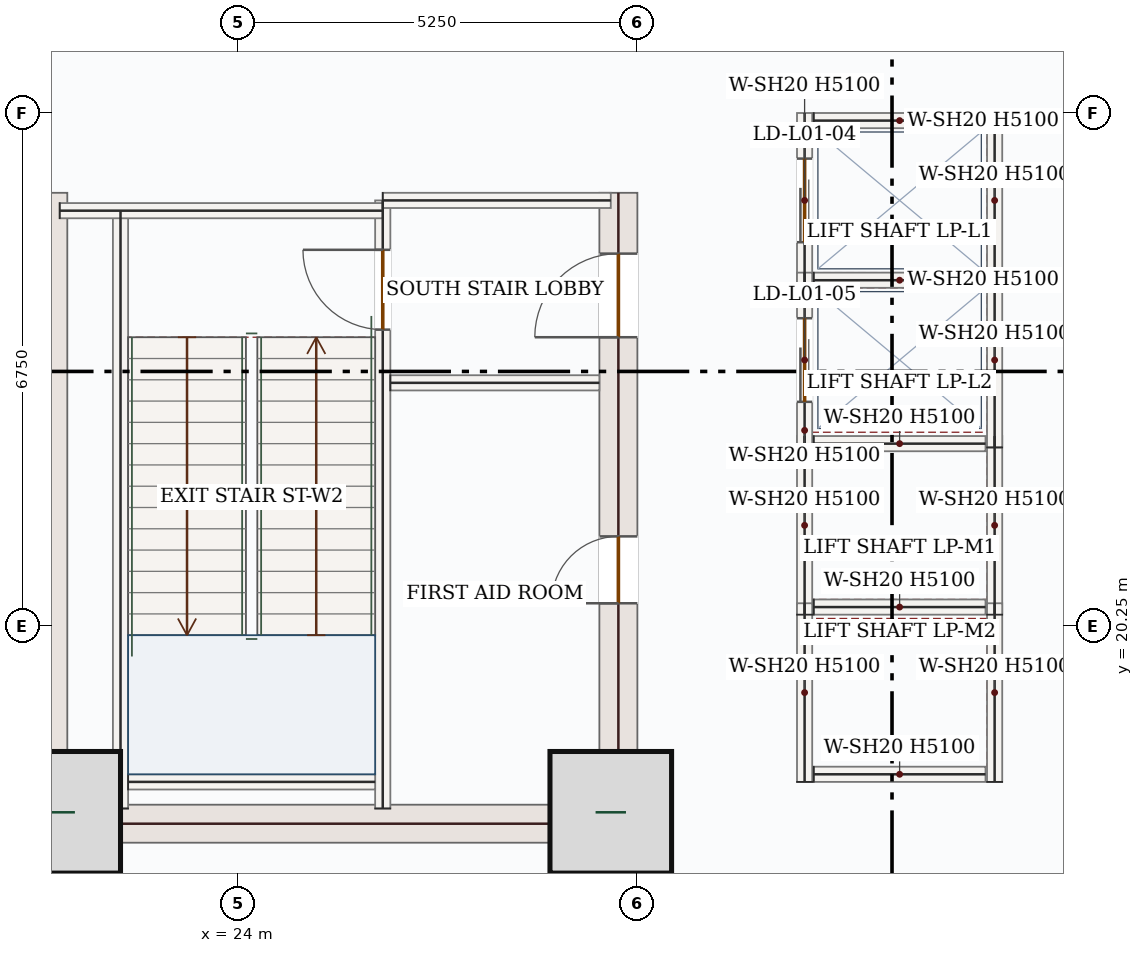
"""IFC4 building model, lengths in metres.
Left out: names, types, materials, properties, quantities, classifications, styles, units other than length and angle.
Written with IfcOpenShell. Run it as: python <this file> out.ifc"""

import sys

from ifc_helpers import new_model, si_unit, direction, frame, frame_2d, origin, origin_2d, place, context, subcontext, project, spatial, rectangle, extrude, source, transform, mapped, element, fill, save


model = new_model("IFC4")
c1 = context("Model", 3, precision=1e-05, world=origin(), true_north=direction((0.0, 1.0)))
c2 = subcontext(c1, "Body", "Model", "MODEL_VIEW")
j1 = project(units=[si_unit("LENGTHUNIT", "METRE"), si_unit("PLANEANGLEUNIT", "RADIAN")], contexts=[c1])
p1 = place(None, origin())
s1 = spatial("IfcSite", under=j1, at=p1, CompositionType="ELEMENT")
p2 = place(p1, origin())
s2 = spatial("IfcBuilding", under=s1, at=p2, CompositionType="ELEMENT")
p3 = place(p2, frame((0.0, 0.0, 7.2)))
s3 = spatial("IfcBuildingStorey", under=s2, at=p3, CompositionType="ELEMENT", Elevation=7.2)
m1 = source(origin(), c2, "Body", "SweptSolid", [
    extrude(rectangle(XDim=8.55, YDim=0.5, at=frame_2d((4.275, 0.0))), origin(), (0.0, 0.0, 1.0), 5.1),
])
p4 = place(p3, frame((21.5, 17.4, 0.0), z_axis=(0.0, 0.0, 1.0), x_axis=(0.0, 1.0, 0.0)))
e1 = element("IfcWall", 1, at=p4, inside=s3, PredefinedType="SHEAR", context=c2, shape_type="MappedRepresentation", body=[
    mapped(m1, transform((0.0, 0.0, 0.0), x_axis=(1.0, 0.0, 0.0), y_axis=(0.0, 1.0, 0.0), z_axis=(0.0, 0.0, 1.0), scale=1.0)),
])
p5 = place(p3, frame((29.0, 17.4, 0.0), z_axis=(0.0, 0.0, 1.0), x_axis=(0.0, 1.0, 0.0)))
e2 = element("IfcWall", 2, at=p5, inside=s3, PredefinedType="SHEAR", context=c2, shape_type="SweptSolid", body=[
    extrude(rectangle(XDim=8.55, YDim=0.5, at=frame_2d((4.275, 0.0))), origin(), (0.0, 0.0, 1.0), 5.1),
])
p6 = place(p5, frame((6.65, 0.0, 0.0)))
e3 = element("IfcOpeningElement", 3, at=p6, cuts=e2, PredefinedType="OPENING", context=c2, shape_type="SweptSolid", body=[
    extrude(rectangle(XDim=1.1, YDim=2.2, at=frame_2d((0.55, 1.1))), frame((0.0, 0.26, 0.0), z_axis=(0.0, -1.0, 0.0), x_axis=(1.0, 0.0, 0.0)), (0.0, 0.0, 1.0), 0.52),
])
p7 = place(p5, frame((3.15, 0.0, 0.0)))
e4 = element("IfcOpeningElement", 4, at=p7, cuts=e2, PredefinedType="OPENING", context=c2, shape_type="SweptSolid", body=[
    extrude(rectangle(XDim=0.88, YDim=2.1, at=frame_2d((0.44, 1.05))), frame((0.0, 0.26, 0.0), z_axis=(0.0, -1.0, 0.0), x_axis=(1.0, 0.0, 0.0)), (0.0, 0.0, 1.0), 0.52),
])
m2 = source(origin(), c2, "Body", "SweptSolid", [
    extrude(rectangle(XDim=7.0, YDim=0.5, at=frame_2d((3.5, 0.0))), origin(), (0.0, 0.0, 1.0), 5.1),
])
p8 = place(p3, frame((21.75, 17.65, 0.0), z_axis=(0.0, 0.0, 1.0), x_axis=(1.0, 0.0, 0.0)))
e5 = element("IfcWall", 5, at=p8, inside=s3, PredefinedType="SHEAR", context=c2, shape_type="MappedRepresentation", body=[
    mapped(m2, transform((0.0, 0.0, 0.0), x_axis=(1.0, 0.0, 0.0), y_axis=(0.0, 1.0, 0.0), z_axis=(0.0, 0.0, 1.0), scale=1.0)),
])
m3 = source(origin(), c2, "Body", "SweptSolid", [
    extrude(rectangle(XDim=1.6, YDim=1.6, at=origin_2d()), origin(), (0.0, 0.0, 1.0), 5.4),
])
for number, where, z_axis, x_axis in (
    (6, (21.65, 17.8, 0.0), (0.0, 0.0, 1.0), (1.0, 0.0, 0.0)),
    (7, (28.9, 17.8, 0.0), (0.0, 0.0, 1.0), (1.0, 0.0, 0.0)),
):
    element("IfcColumn", number, at=place(p3, frame(where, z_axis=z_axis, x_axis=x_axis)), inside=s3, PredefinedType="COLUMN", context=c2, shape_type="MappedRepresentation", body=[
        mapped(m3, transform((0.0, 0.0, 0.0), x_axis=(1.0, 0.0, 0.0), y_axis=(0.0, 1.0, 0.0), z_axis=(0.0, 0.0, 1.0), scale=1.0)),
    ])
m4 = source(origin(), c2, "Body", "SweptSolid", [
    extrude(rectangle(XDim=7.87, YDim=0.2, at=frame_2d((3.935, 0.0))), origin(), (0.0, 0.0, 1.0), 5.1),
])
p9 = place(p3, frame((22.45, 17.85, 0.0), z_axis=(0.0, 0.0, 1.0), x_axis=(0.0, 1.0, 0.0)))
e8 = element("IfcWall", 8, at=p9, inside=s3, PredefinedType="SOLIDWALL", context=c2, shape_type="MappedRepresentation", body=[
    mapped(m4, transform((0.0, 0.0, 0.0), x_axis=(1.0, 0.0, 0.0), y_axis=(0.0, 1.0, 0.0), z_axis=(0.0, 0.0, 1.0), scale=1.0)),
])
p10 = place(p3, frame((25.9, 17.85, 0.0), z_axis=(0.0, 0.0, 1.0), x_axis=(0.0, 1.0, 0.0)))
e9 = element("IfcWall", 9, at=p10, inside=s3, PredefinedType="SOLIDWALL", context=c2, shape_type="SweptSolid", body=[
    extrude(rectangle(XDim=8.0, YDim=0.2, at=frame_2d((4.0, 0.0))), origin(), (0.0, 0.0, 1.0), 5.1),
])
p11 = place(p10, frame((6.3, 0.0, 0.0)))
e10 = element("IfcOpeningElement", 10, at=p11, cuts=e9, PredefinedType="OPENING", context=c2, shape_type="SweptSolid", body=[
    extrude(rectangle(XDim=1.05, YDim=2.15, at=frame_2d((0.525, 1.075))), frame((0.0, 0.11, 0.0), z_axis=(0.0, -1.0, 0.0), x_axis=(1.0, 0.0, 0.0)), (0.0, 0.0, 1.0), 0.22),
])
m5 = source(origin(), c2, "Body", "SweptSolid", [
    extrude(rectangle(XDim=4.25, YDim=0.2, at=frame_2d((2.125, 0.0))), origin(), (0.0, 0.0, 1.0), 5.1),
])
p12 = place(p3, frame((21.65, 25.715, 0.0), z_axis=(0.0, 0.0, 1.0), x_axis=(1.0, 0.0, 0.0)))
e11 = element("IfcWall", 11, at=p12, inside=s3, PredefinedType="SOLIDWALL", context=c2, shape_type="MappedRepresentation", body=[
    mapped(m5, transform((0.0, 0.0, 0.0), x_axis=(1.0, 0.0, 0.0), y_axis=(0.0, 1.0, 0.0), z_axis=(0.0, 0.0, 1.0), scale=1.0)),
])
m6 = source(origin(), c2, "Body", "SweptSolid", [
    extrude(rectangle(XDim=3.0, YDim=0.2, at=frame_2d((1.5, 0.0))), origin(), (0.0, 0.0, 1.0), 5.1),
])
p13 = place(p3, frame((25.9, 25.85, 0.0), z_axis=(0.0, 0.0, 1.0), x_axis=(1.0, 0.0, 0.0)))
e12 = element("IfcWall", 12, at=p13, inside=s3, PredefinedType="SOLIDWALL", context=c2, shape_type="MappedRepresentation", body=[
    mapped(m6, transform((0.0, 0.0, 0.0), x_axis=(1.0, 0.0, 0.0), y_axis=(0.0, 1.0, 0.0), z_axis=(0.0, 0.0, 1.0), scale=1.0)),
])
m7 = source(origin(), c2, "Body", "SweptSolid", [
    extrude(rectangle(XDim=3.25, YDim=0.2, at=frame_2d((1.625, 0.0))), origin(), (0.0, 0.0, 1.0), 5.1),
])
p14 = place(p3, frame((22.55, 18.2, 0.0), z_axis=(0.0, 0.0, 1.0), x_axis=(1.0, 0.0, 0.0)))
e13 = element("IfcWall", 13, at=p14, inside=s3, PredefinedType="SOLIDWALL", context=c2, shape_type="MappedRepresentation", body=[
    mapped(m7, transform((0.0, 0.0, 0.0), x_axis=(1.0, 0.0, 0.0), y_axis=(0.0, 1.0, 0.0), z_axis=(0.0, 0.0, 1.0), scale=1.0)),
])
m8 = source(origin(), c2, "Body", "SweptSolid", [
    extrude(rectangle(XDim=2.75, YDim=0.2, at=frame_2d((1.375, 0.0))), origin(), (0.0, 0.0, 1.0), 5.1),
])
p15 = place(p3, frame((26.0, 23.45, 0.0), z_axis=(0.0, 0.0, 1.0), x_axis=(1.0, 0.0, 0.0)))
e14 = element("IfcWall", 14, at=p15, inside=s3, PredefinedType="SOLIDWALL", context=c2, shape_type="MappedRepresentation", body=[
    mapped(m8, transform((0.0, 0.0, 0.0), x_axis=(1.0, 0.0, 0.0), y_axis=(0.0, 1.0, 0.0), z_axis=(0.0, 0.0, 1.0), scale=1.0)),
])
m9 = source(origin(), c2, "Body", "SweptSolid", [
    extrude(rectangle(XDim=2.35, YDim=0.2, at=frame_2d((1.175, 0.0))), origin(), (0.0, 0.0, 1.0), 5.1),
])
for number, where, z_axis, x_axis in (
    (15, (31.45, 20.4, 0.0), (0.0, 0.0, 1.0), (0.0, 1.0, 0.0)),
    (16, (33.95, 20.4, 0.0), (0.0, 0.0, 1.0), (0.0, 1.0, 0.0)),
):
    element("IfcWall", number, at=place(p3, frame(where, z_axis=z_axis, x_axis=x_axis)), inside=s3, PredefinedType="SOLIDWALL", context=c2, shape_type="MappedRepresentation", body=[
        mapped(m9, transform((0.0, 0.0, 0.0), x_axis=(1.0, 0.0, 0.0), y_axis=(0.0, 1.0, 0.0), z_axis=(0.0, 0.0, 1.0), scale=1.0)),
    ])
m10 = source(origin(), c2, "Body", "SweptSolid", [
    extrude(rectangle(XDim=2.26, YDim=0.2, at=frame_2d((1.13, 0.0))), origin(), (0.0, 0.0, 1.0), 5.1),
])
for number, where, z_axis, x_axis in (
    (17, (31.57, 20.5, 0.0), (0.0, 0.0, 1.0), (1.0, 0.0, 0.0)),
    (18, (31.57, 22.65, 0.0), (0.0, 0.0, 1.0), (1.0, 0.0, 0.0)),
):
    element("IfcWall", number, at=place(p3, frame(where, z_axis=z_axis, x_axis=x_axis)), inside=s3, PredefinedType="SOLIDWALL", context=c2, shape_type="MappedRepresentation", body=[
        mapped(m10, transform((0.0, 0.0, 0.0), x_axis=(1.0, 0.0, 0.0), y_axis=(0.0, 1.0, 0.0), z_axis=(0.0, 0.0, 1.0), scale=1.0)),
    ])
for number, where, z_axis, x_axis in (
    (19, (31.45, 18.2, 0.0), (0.0, 0.0, 1.0), (0.0, 1.0, 0.0)),
    (20, (33.95, 18.2, 0.0), (0.0, 0.0, 1.0), (0.0, 1.0, 0.0)),
):
    element("IfcWall", number, at=place(p3, frame(where, z_axis=z_axis, x_axis=x_axis)), inside=s3, PredefinedType="SOLIDWALL", context=c2, shape_type="MappedRepresentation", body=[
        mapped(m9, transform((0.0, 0.0, 0.0), x_axis=(1.0, 0.0, 0.0), y_axis=(0.0, 1.0, 0.0), z_axis=(0.0, 0.0, 1.0), scale=1.0)),
    ])
p16 = place(p3, frame((31.57, 18.3, 0.0), z_axis=(0.0, 0.0, 1.0), x_axis=(1.0, 0.0, 0.0)))
e21 = element("IfcWall", 21, at=p16, inside=s3, PredefinedType="SOLIDWALL", context=c2, shape_type="MappedRepresentation", body=[
    mapped(m10, transform((0.0, 0.0, 0.0), x_axis=(1.0, 0.0, 0.0), y_axis=(0.0, 1.0, 0.0), z_axis=(0.0, 0.0, 1.0), scale=1.0)),
])
p17 = place(p3, frame((31.45, 24.7, 0.0), z_axis=(0.0, 0.0, 1.0), x_axis=(0.0, 1.0, 0.0)))
e22 = element("IfcWall", 22, at=p17, inside=s3, PredefinedType="SOLIDWALL", context=c2, shape_type="SweptSolid", body=[
    extrude(rectangle(XDim=2.3, YDim=0.2, at=frame_2d((1.15, 0.0))), origin(), (0.0, 0.0, 1.0), 5.1),
])
p18 = place(p17, frame((0.6, 0.0, 0.0)))
e23 = element("IfcOpeningElement", 23, at=p18, cuts=e22, PredefinedType="OPENING", context=c2, shape_type="SweptSolid", body=[
    extrude(rectangle(XDim=1.1, YDim=2.15, at=frame_2d((0.55, 1.075))), frame((0.0, 0.11, 0.0), z_axis=(0.0, -1.0, 0.0), x_axis=(1.0, 0.0, 0.0)), (0.0, 0.0, 1.0), 0.22),
])
m11 = source(origin(), c2, "Body", "SweptSolid", [
    extrude(rectangle(XDim=2.3, YDim=0.2, at=frame_2d((1.15, 0.0))), origin(), (0.0, 0.0, 1.0), 5.1),
])
p19 = place(p3, frame((33.95, 24.7, 0.0), z_axis=(0.0, 0.0, 1.0), x_axis=(0.0, 1.0, 0.0)))
e24 = element("IfcWall", 24, at=p19, inside=s3, PredefinedType="SOLIDWALL", context=c2, shape_type="MappedRepresentation", body=[
    mapped(m11, transform((0.0, 0.0, 0.0), x_axis=(1.0, 0.0, 0.0), y_axis=(0.0, 1.0, 0.0), z_axis=(0.0, 0.0, 1.0), scale=1.0)),
])
for number, where, z_axis, x_axis in (
    (25, (31.57, 24.8, 0.0), (0.0, 0.0, 1.0), (1.0, 0.0, 0.0)),
    (26, (31.57, 26.9, 0.0), (0.0, 0.0, 1.0), (1.0, 0.0, 0.0)),
):
    element("IfcWall", number, at=place(p3, frame(where, z_axis=z_axis, x_axis=x_axis)), inside=s3, PredefinedType="SOLIDWALL", context=c2, shape_type="MappedRepresentation", body=[
        mapped(m10, transform((0.0, 0.0, 0.0), x_axis=(1.0, 0.0, 0.0), y_axis=(0.0, 1.0, 0.0), z_axis=(0.0, 0.0, 1.0), scale=1.0)),
    ])
p20 = place(p3, frame((31.45, 22.6, 0.0), z_axis=(0.0, 0.0, 1.0), x_axis=(0.0, 1.0, 0.0)))
e27 = element("IfcWall", 27, at=p20, inside=s3, PredefinedType="SOLIDWALL", context=c2, shape_type="SweptSolid", body=[
    extrude(rectangle(XDim=2.3, YDim=0.2, at=frame_2d((1.15, 0.0))), origin(), (0.0, 0.0, 1.0), 5.1),
])
p21 = place(p20, frame((0.6, 0.0, 0.0)))
e28 = element("IfcOpeningElement", 28, at=p21, cuts=e27, PredefinedType="OPENING", context=c2, shape_type="SweptSolid", body=[
    extrude(rectangle(XDim=1.1, YDim=2.15, at=frame_2d((0.55, 1.075))), frame((0.0, 0.11, 0.0), z_axis=(0.0, -1.0, 0.0), x_axis=(1.0, 0.0, 0.0)), (0.0, 0.0, 1.0), 0.22),
])
m12 = source(origin(), c2, "Body", "SweptSolid", [
    extrude(rectangle(XDim=2.3, YDim=0.2, at=frame_2d((1.15, 0.0))), origin(), (0.0, 0.0, 1.0), 5.1),
])
p22 = place(p3, frame((33.95, 22.6, 0.0), z_axis=(0.0, 0.0, 1.0), x_axis=(0.0, 1.0, 0.0)))
e29 = element("IfcWall", 29, at=p22, inside=s3, PredefinedType="SOLIDWALL", context=c2, shape_type="MappedRepresentation", body=[
    mapped(m12, transform((0.0, 0.0, 0.0), x_axis=(1.0, 0.0, 0.0), y_axis=(0.0, 1.0, 0.0), z_axis=(0.0, 0.0, 1.0), scale=1.0)),
])
m13 = source(origin(), c2, "Body", "SweptSolid", [
    extrude(rectangle(XDim=1.05, YDim=2.15, at=frame_2d((0.525, 1.075))), frame((0.0, 0.025, 0.0), z_axis=(0.0, -1.0, 0.0), x_axis=(1.0, 0.0, 0.0)), (0.0, 0.0, 1.0), 0.05),
])
p23 = place(p11, origin())
e30 = element("IfcDoor", 30, at=p23, inside=s3, OperationType="SINGLE_SWING_RIGHT", PredefinedType="DOOR", context=c2, shape_type="MappedRepresentation", body=[
    mapped(m13, transform((0.0, 0.0, 0.0), x_axis=(1.0, 0.0, 0.0), y_axis=(0.0, 1.0, 0.0), z_axis=(0.0, 0.0, 1.0), scale=1.0)),
])
fill(e10, e30)
m14 = source(origin(), c2, "Body", "SweptSolid", [
    extrude(rectangle(XDim=1.1, YDim=2.2, at=frame_2d((0.55, 1.1))), frame((0.0, 0.025, 0.0), z_axis=(0.0, -1.0, 0.0), x_axis=(1.0, 0.0, 0.0)), (0.0, 0.0, 1.0), 0.05),
])
p24 = place(p6, origin())
e31 = element("IfcDoor", 31, at=p24, inside=s3, OperationType="SINGLE_SWING_LEFT", PredefinedType="DOOR", context=c2, shape_type="MappedRepresentation", body=[
    mapped(m14, transform((0.0, 0.0, 0.0), x_axis=(1.0, 0.0, 0.0), y_axis=(0.0, 1.0, 0.0), z_axis=(0.0, 0.0, 1.0), scale=1.0)),
])
fill(e3, e31)
m15 = source(origin(), c2, "Body", "SweptSolid", [
    extrude(rectangle(XDim=0.88, YDim=2.1, at=frame_2d((0.44, 1.05))), frame((0.0, 0.025, 0.0), z_axis=(0.0, -1.0, 0.0), x_axis=(1.0, 0.0, 0.0)), (0.0, 0.0, 1.0), 0.05),
])
p25 = place(p7, origin())
e32 = element("IfcDoor", 32, at=p25, inside=s3, OperationType="SINGLE_SWING_LEFT", PredefinedType="DOOR", context=c2, shape_type="MappedRepresentation", body=[
    mapped(m15, transform((0.0, 0.0, 0.0), x_axis=(1.0, 0.0, 0.0), y_axis=(0.0, 1.0, 0.0), z_axis=(0.0, 0.0, 1.0), scale=1.0)),
])
fill(e4, e32)
m16 = source(origin(), c2, "Body", "SweptSolid", [
    extrude(rectangle(XDim=1.1, YDim=2.15, at=frame_2d((0.55, 1.075))), frame((0.0, 0.025, 0.0), z_axis=(0.0, -1.0, 0.0), x_axis=(1.0, 0.0, 0.0)), (0.0, 0.0, 1.0), 0.05),
])
p26 = place(p18, origin())
e33 = element("IfcDoor", 33, at=p26, inside=s3, OperationType="DOUBLE_DOOR_SLIDING", PredefinedType="DOOR", context=c2, shape_type="MappedRepresentation", body=[
    mapped(m16, transform((0.0, 0.0, 0.0), x_axis=(1.0, 0.0, 0.0), y_axis=(0.0, 1.0, 0.0), z_axis=(0.0, 0.0, 1.0), scale=1.0)),
])
fill(e23, e33)
p27 = place(p21, origin())
e34 = element("IfcDoor", 34, at=p27, inside=s3, OperationType="DOUBLE_DOOR_SLIDING", PredefinedType="DOOR", context=c2, shape_type="MappedRepresentation", body=[
    mapped(m16, transform((0.0, 0.0, 0.0), x_axis=(1.0, 0.0, 0.0), y_axis=(0.0, 1.0, 0.0), z_axis=(0.0, 0.0, 1.0), scale=1.0)),
])
fill(e28, e34)
save(model, sys.argv[1])
